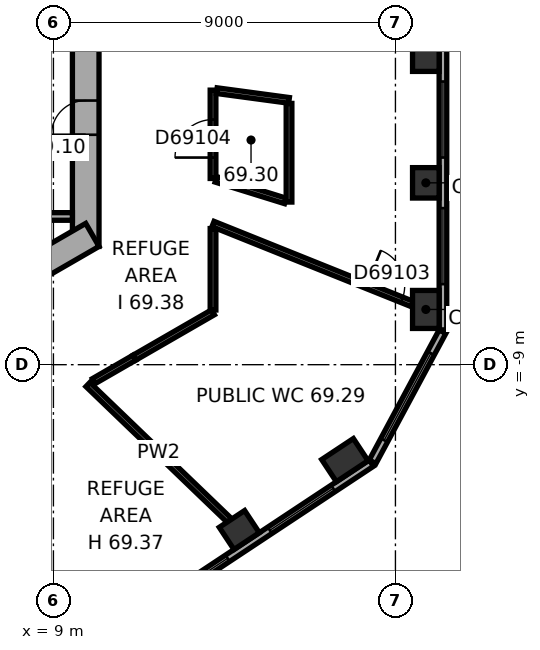
"""IFC4 building model, lengths in metres.
Left out: names, types, materials, properties, quantities, classifications, styles, units other than length and angle.
Written with IfcOpenShell. Run it as: python <this file> out.ifc"""

import sys

from ifc_helpers import new_model, si_unit, direction, frame, frame_2d, origin, origin_2d, place, context, subcontext, project, spatial, rectangle, extrude, element, fill, save


model = new_model("IFC4")
c1 = context("Model", 3, precision=1e-05, world=origin(), true_north=direction((0.0, 1.0)))
c2 = subcontext(c1, "Body", "Model", "MODEL_VIEW")
j1 = project(units=[si_unit("LENGTHUNIT", "METRE"), si_unit("PLANEANGLEUNIT", "RADIAN")], contexts=[c1])
p1 = place(None, origin())
s1 = spatial("IfcSite", under=j1, at=p1, CompositionType="ELEMENT")
p2 = place(p1, origin())
s2 = spatial("IfcBuilding", under=s1, at=p2, CompositionType="ELEMENT")
p3 = place(p2, frame((0.0, 0.0, 278.3)))
s3 = spatial("IfcBuildingStorey", under=s2, at=p3, CompositionType="ELEMENT", Elevation=278.3)
p4 = place(p3, frame((18.8, -7.547, 0.0), z_axis=(0.0, 0.0, 1.0), x_axis=(0.0, 1.0, 0.0)))
e1 = element("IfcColumn", 1, at=p4, inside=s3, PredefinedType="COLUMN", context=c2, shape_type="SweptSolid", body=[
    extrude(rectangle(XDim=1.0, YDim=0.7, at=origin_2d()), origin(), (0.0, 0.0, 1.0), 7.4),
])
for number, where, z_axis, x_axis in (
    (2, (18.8, -4.215, 0.0), (0.0, 0.0, 1.0), (0.0, 1.0, 0.0)),
    (3, (18.8, -0.883, 0.0), (0.0, 0.0, 1.0), (0.0, 1.0, 0.0)),
    (4, (13.891, -13.351, 0.0), (0.0, 0.0, 1.0), (0.834, 0.552, 0.0)),
):
    element("IfcColumn", number, at=place(p3, frame(where, z_axis=z_axis, x_axis=x_axis)), inside=s3, PredefinedType="COLUMN", context=c2, shape_type="SweptSolid", body=[
        extrude(rectangle(XDim=0.8, YDim=0.7, at=origin_2d()), origin(), (0.0, 0.0, 1.0), 7.4),
    ])
p5 = place(p3, frame((16.669, -11.512, 0.0), z_axis=(0.0, 0.0, 1.0), x_axis=(0.833885822067, 0.551936985312, 0.0)))
e5 = element("IfcColumn", 5, at=p5, inside=s3, PredefinedType="COLUMN", context=c2, shape_type="SweptSolid", body=[
    extrude(rectangle(XDim=1.0, YDim=0.7, at=origin_2d()), origin(), (0.0, 0.0, 1.0), 7.4),
])
p6 = place(p3, frame((9.85, -5.889, 0.0), z_axis=(0.0, 0.0, 1.0), x_axis=(0.0, 1.0, 0.0)))
e6 = element("IfcWall", 6, at=p6, inside=s3, PredefinedType="SHEAR", context=c2, shape_type="SweptSolid", body=[
    extrude(rectangle(XDim=11.778, YDim=0.7, at=frame_2d((5.889, 0.0))), origin(), (0.0, 0.0, 1.0), 7.4),
])
p7 = place(p6, frame((6.089, 0.0, 0.0)))
e7 = element("IfcOpeningElement", 7, at=p7, cuts=e6, PredefinedType="OPENING", context=c2, shape_type="SweptSolid", body=[
    extrude(rectangle(XDim=1.5, YDim=2.1, at=frame_2d((0.75, 1.05))), frame((0.0, 0.36, 0.0), z_axis=(0.0, -1.0, 0.0), x_axis=(1.0, 0.0, 0.0)), (0.0, 0.0, 1.0), 0.72),
])
p8 = place(p6, frame((2.939, 0.0, 0.0)))
e8 = element("IfcOpeningElement", 8, at=p8, cuts=e6, PredefinedType="OPENING", context=c2, shape_type="SweptSolid", body=[
    extrude(rectangle(XDim=0.9, YDim=2.1, at=frame_2d((0.45, 1.05))), frame((0.0, 0.36, 0.0), z_axis=(0.0, -1.0, 0.0), x_axis=(1.0, 0.0, 0.0)), (0.0, 0.0, 1.0), 0.72),
])
p9 = place(p3, frame((-0.175, -11.475, 0.0), z_axis=(0.0, 0.0, 1.0), x_axis=(0.866026453023, 0.499998182661, 0.0)))
e9 = element("IfcWall", 9, at=p9, inside=s3, PredefinedType="SHEAR", context=c2, shape_type="SweptSolid", body=[
    extrude(rectangle(XDim=11.778, YDim=0.7, at=frame_2d((5.889, 0.0))), origin(), (0.0, 0.0, 1.0), 7.4),
])
p10 = place(p9, frame((2.439, 0.0, 0.0)))
e10 = element("IfcOpeningElement", 10, at=p10, cuts=e9, PredefinedType="OPENING", context=c2, shape_type="SweptSolid", body=[
    extrude(rectangle(XDim=1.1, YDim=2.1, at=frame_2d((0.55, 1.05))), frame((0.0, 0.36, 0.0), z_axis=(0.0, -1.0, 0.0), x_axis=(1.0, 0.0, 0.0)), (0.0, 0.0, 1.0), 0.72),
])
p11 = place(p9, frame((5.039, 0.0, 0.0)))
e11 = element("IfcOpeningElement", 11, at=p11, cuts=e9, PredefinedType="OPENING", context=c2, shape_type="SweptSolid", body=[
    extrude(rectangle(XDim=1.1, YDim=2.1, at=frame_2d((0.55, 1.05))), frame((0.0, 0.36, 0.0), z_axis=(0.0, -1.0, 0.0), x_axis=(1.0, 0.0, 0.0)), (0.0, 0.0, 1.0), 0.72),
])
p12 = place(p9, frame((7.639, 0.0, 0.0)))
e12 = element("IfcOpeningElement", 12, at=p12, cuts=e9, PredefinedType="OPENING", context=c2, shape_type="SweptSolid", body=[
    extrude(rectangle(XDim=1.1, YDim=2.1, at=frame_2d((0.55, 1.05))), frame((0.0, 0.36, 0.0), z_axis=(0.0, -1.0, 0.0), x_axis=(1.0, 0.0, 0.0)), (0.0, 0.0, 1.0), 0.72),
])
p13 = place(p3, frame((19.25, -8.084, 0.0), z_axis=(0.0, 0.0, 1.0), x_axis=(0.0, 1.0, 0.0)))
e13 = element("IfcWall", 13, at=p13, inside=s3, PredefinedType="STANDARD", context=c2, shape_type="SweptSolid", body=[
    extrude(rectangle(XDim=17.731, YDim=0.2, at=frame_2d((8.866, 0.0))), origin(), (0.0, 0.0, 1.0), 7.4),
])
p14 = place(p13, frame((1.203, 0.0, 0.8)))
e14 = element("IfcOpeningElement", 14, at=p14, cuts=e13, PredefinedType="OPENING", context=c2, shape_type="SweptSolid", body=[
    extrude(rectangle(XDim=2.0, YDim=4.2, at=frame_2d((1.0, 2.1))), frame((0.0, 0.11, 0.0), z_axis=(0.0, -1.0, 0.0), x_axis=(1.0, 0.0, 0.0)), (0.0, 0.0, 1.0), 0.22),
])
p15 = place(p13, frame((4.535, 0.0, 0.8)))
e15 = element("IfcOpeningElement", 15, at=p15, cuts=e13, PredefinedType="OPENING", context=c2, shape_type="SweptSolid", body=[
    extrude(rectangle(XDim=2.0, YDim=4.2, at=frame_2d((1.0, 2.1))), frame((0.0, 0.11, 0.0), z_axis=(0.0, -1.0, 0.0), x_axis=(1.0, 0.0, 0.0)), (0.0, 0.0, 1.0), 0.22),
])
p16 = place(p13, frame((7.866, 0.0, 0.8)))
e16 = element("IfcOpeningElement", 16, at=p16, cuts=e13, PredefinedType="OPENING", context=c2, shape_type="SweptSolid", body=[
    extrude(rectangle(XDim=2.0, YDim=4.2, at=frame_2d((1.0, 2.1))), frame((0.0, 0.11, 0.0), z_axis=(0.0, -1.0, 0.0), x_axis=(1.0, 0.0, 0.0)), (0.0, 0.0, 1.0), 0.22),
])
p17 = place(p13, frame((11.198, 0.0, 0.8)))
e17 = element("IfcOpeningElement", 17, at=p17, cuts=e13, PredefinedType="OPENING", context=c2, shape_type="SweptSolid", body=[
    extrude(rectangle(XDim=2.0, YDim=4.2, at=frame_2d((1.0, 2.1))), frame((0.0, 0.11, 0.0), z_axis=(0.0, -1.0, 0.0), x_axis=(1.0, 0.0, 0.0)), (0.0, 0.0, 1.0), 0.22),
])
p18 = place(p13, frame((14.53, 0.0, 0.8)))
e18 = element("IfcOpeningElement", 18, at=p18, cuts=e13, PredefinedType="OPENING", context=c2, shape_type="SweptSolid", body=[
    extrude(rectangle(XDim=2.0, YDim=4.2, at=frame_2d((1.0, 2.1))), frame((0.0, 0.11, 0.0), z_axis=(0.0, -1.0, 0.0), x_axis=(1.0, 0.0, 0.0)), (0.0, 0.0, 1.0), 0.22),
])
p19 = place(p3, frame((2.58, -21.377, 0.0), z_axis=(0.0, 0.0, 1.0), x_axis=(0.833888592176, 0.551932800112, 0.0)))
e19 = element("IfcWall", 19, at=p19, inside=s3, PredefinedType="STANDARD", context=c2, shape_type="SweptSolid", body=[
    extrude(rectangle(XDim=17.731, YDim=0.2, at=frame_2d((8.866, 0.0))), origin(), (0.0, 0.0, 1.0), 7.4),
])
p20 = place(p19, frame((1.202, 0.0, 0.8)))
e20 = element("IfcOpeningElement", 20, at=p20, cuts=e19, PredefinedType="OPENING", context=c2, shape_type="SweptSolid", body=[
    extrude(rectangle(XDim=2.0, YDim=4.2, at=frame_2d((1.0, 2.1))), frame((0.0, 0.11, 0.0), z_axis=(0.0, -1.0, 0.0), x_axis=(1.0, 0.0, 0.0)), (0.0, 0.0, 1.0), 0.22),
])
p21 = place(p19, frame((4.533, 0.0, 0.8)))
e21 = element("IfcOpeningElement", 21, at=p21, cuts=e19, PredefinedType="OPENING", context=c2, shape_type="SweptSolid", body=[
    extrude(rectangle(XDim=2.0, YDim=4.2, at=frame_2d((1.0, 2.1))), frame((0.0, 0.11, 0.0), z_axis=(0.0, -1.0, 0.0), x_axis=(1.0, 0.0, 0.0)), (0.0, 0.0, 1.0), 0.22),
])
p22 = place(p19, frame((7.865, 0.0, 0.8)))
e22 = element("IfcOpeningElement", 22, at=p22, cuts=e19, PredefinedType="OPENING", context=c2, shape_type="SweptSolid", body=[
    extrude(rectangle(XDim=2.0, YDim=4.2, at=frame_2d((1.0, 2.1))), frame((0.0, 0.11, 0.0), z_axis=(0.0, -1.0, 0.0), x_axis=(1.0, 0.0, 0.0)), (0.0, 0.0, 1.0), 0.22),
])
p23 = place(p19, frame((11.197, 0.0, 0.8)))
e23 = element("IfcOpeningElement", 23, at=p23, cuts=e19, PredefinedType="OPENING", context=c2, shape_type="SweptSolid", body=[
    extrude(rectangle(XDim=2.0, YDim=4.2, at=frame_2d((1.0, 2.1))), frame((0.0, 0.11, 0.0), z_axis=(0.0, -1.0, 0.0), x_axis=(1.0, 0.0, 0.0)), (0.0, 0.0, 1.0), 0.22),
])
p24 = place(p19, frame((14.528, 0.0, 0.8)))
e24 = element("IfcOpeningElement", 24, at=p24, cuts=e19, PredefinedType="OPENING", context=c2, shape_type="SweptSolid", body=[
    extrude(rectangle(XDim=2.0, YDim=4.2, at=frame_2d((1.0, 2.1))), frame((0.0, 0.11, 0.0), z_axis=(0.0, -1.0, 0.0), x_axis=(1.0, 0.0, 0.0)), (0.0, 0.0, 1.0), 0.22),
])
p25 = place(p3, frame((17.399, -11.554, 0.0), z_axis=(0.0, 0.0, 1.0), x_axis=(0.473309051311, 0.880896442238, 0.0)))
e25 = element("IfcWall", 25, at=p25, inside=s3, PredefinedType="STANDARD", context=c2, shape_type="SweptSolid", body=[
    extrude(rectangle(XDim=3.886, YDim=0.2, at=frame_2d((1.943, 0.0))), origin(), (0.0, 0.0, 1.0), 7.4),
])
p26 = place(p25, frame((0.643, 0.0, 0.8)))
e26 = element("IfcOpeningElement", 26, at=p26, cuts=e25, PredefinedType="OPENING", context=c2, shape_type="SweptSolid", body=[
    extrude(rectangle(XDim=2.6, YDim=4.2, at=frame_2d((1.3, 2.1))), frame((0.0, 0.11, 0.0), z_axis=(0.0, -1.0, 0.0), x_axis=(1.0, 0.0, 0.0)), (0.0, 0.0, 1.0), 0.22),
])
p27 = place(p3, frame((7.3, -5.1, 0.0), z_axis=(0.0, 0.0, 1.0), x_axis=(1.0, 0.0, 0.0)))
e27 = element("IfcWall", 27, at=p27, inside=s3, PredefinedType="PARTITIONING", context=c2, shape_type="SweptSolid", body=[
    extrude(rectangle(XDim=2.2, YDim=0.2, at=frame_2d((1.1, 0.0))), origin(), (0.0, 0.0, 1.0), 7.12),
])
p28 = place(p3, frame((13.633, -13.102, 0.0), z_axis=(0.0, 0.0, 1.0), x_axis=(-0.721024625755, 0.692909437845, 0.0)))
e28 = element("IfcWall", 28, at=p28, inside=s3, PredefinedType="PARTITIONING", context=c2, shape_type="SweptSolid", body=[
    extrude(rectangle(XDim=5.167, YDim=0.15, at=frame_2d((2.583, 0.0))), origin(), (0.0, 0.0, 1.0), 6.57),
])
p29 = place(p3, frame((11.127, -8.817, 0.0), z_axis=(0.0, 0.0, 1.0), x_axis=(-0.866020046725, -0.500009278584, 0.0)))
e29 = element("IfcWall", 29, at=p29, inside=s3, PredefinedType="PARTITIONING", context=c2, shape_type="SweptSolid", body=[
    extrude(rectangle(XDim=1.228, YDim=0.15, at=frame_2d((0.614, 0.0))), origin(), (0.0, 0.0, 1.0), 7.12),
])
p30 = place(p3, frame((11.127, -8.817, 0.0), z_axis=(0.0, 0.0, 1.0), x_axis=(0.866075162418, 0.499913805613, 0.0)))
e30 = element("IfcWall", 30, at=p30, inside=s3, PredefinedType="PARTITIONING", context=c2, shape_type="SweptSolid", body=[
    extrude(rectangle(XDim=2.393, YDim=0.15, at=frame_2d((1.197, 0.0))), origin(), (0.0, 0.0, 1.0), 7.12),
])
p31 = place(p3, frame((13.2, -7.561, 0.0), z_axis=(0.0, 0.0, 1.0), x_axis=(0.0, 1.0, 0.0)))
e31 = element("IfcWall", 31, at=p31, inside=s3, PredefinedType="PARTITIONING", context=c2, shape_type="SweptSolid", body=[
    extrude(rectangle(XDim=2.143, YDim=0.15, at=frame_2d((1.071, 0.0))), origin(), (0.0, 0.0, 1.0), 7.12),
])
p32 = place(p3, frame((13.2, -5.299, 0.0), z_axis=(0.0, 0.0, 1.0), x_axis=(0.928023609597, -0.372521381977, 0.0)))
e32 = element("IfcWall", 32, at=p32, inside=s3, PredefinedType="PARTITIONING", context=c2, shape_type="SweptSolid", body=[
    extrude(rectangle(XDim=5.657, YDim=0.15, at=frame_2d((2.829, 0.0))), origin(), (0.0, 0.0, 1.0), 6.57),
])
p33 = place(p32, frame((4.357, 0.0, 0.0)))
e33 = element("IfcOpeningElement", 33, at=p33, cuts=e32, PredefinedType="OPENING", context=c2, shape_type="SweptSolid", body=[
    extrude(rectangle(XDim=1.0, YDim=2.1, at=frame_2d((0.5, 1.05))), frame((0.0, 0.085, 0.0), z_axis=(0.0, -1.0, 0.0), x_axis=(1.0, 0.0, 0.0)), (0.0, 0.0, 1.0), 0.17),
])
p34 = place(p3, frame((15.104, -4.691, 0.0), z_axis=(0.0, 0.0, 1.0), x_axis=(-0.955023043559, 0.296531594054, 0.0)))
e34 = element("IfcWall", 34, at=p34, inside=s3, PredefinedType="PARTITIONING", context=c2, shape_type="SweptSolid", body=[
    extrude(rectangle(XDim=1.914, YDim=0.15, at=frame_2d((0.957, 0.0))), origin(), (0.0, 0.0, 1.0), 7.12),
])
p35 = place(p3, frame((13.2, -4.1, 0.0), z_axis=(0.0, 0.0, 1.0), x_axis=(0.0, 1.0, 0.0)))
e35 = element("IfcWall", 35, at=p35, inside=s3, PredefinedType="PARTITIONING", context=c2, shape_type="SweptSolid", body=[
    extrude(rectangle(XDim=2.324, YDim=0.15, at=frame_2d((1.162, 0.0))), origin(), (0.0, 0.0, 1.0), 7.12),
])
p36 = place(p35, frame((0.55, 0.0, 0.0)))
e36 = element("IfcOpeningElement", 36, at=p36, cuts=e35, PredefinedType="OPENING", context=c2, shape_type="SweptSolid", body=[
    extrude(rectangle(XDim=1.0, YDim=2.1, at=frame_2d((0.5, 1.05))), frame((0.0, 0.085, 0.0), z_axis=(0.0, -1.0, 0.0), x_axis=(1.0, 0.0, 0.0)), (0.0, 0.0, 1.0), 0.17),
])
p37 = place(p3, frame((15.2, -2.125, 0.0), z_axis=(0.0, 0.0, 1.0), x_axis=(0.0, -1.0, 0.0)))
e37 = element("IfcWall", 37, at=p37, inside=s3, PredefinedType="PARTITIONING", context=c2, shape_type="SweptSolid", body=[
    extrude(rectangle(XDim=2.595, YDim=0.15, at=frame_2d((1.298, 0.0))), origin(), (0.0, 0.0, 1.0), 7.12),
])
p38 = place(p3, frame((13.299, -1.789, 0.0), z_axis=(0.0, 0.0, 1.0), x_axis=(0.991045767705, -0.133522606001, 0.0)))
e38 = element("IfcWall", 38, at=p38, inside=s3, PredefinedType="PARTITIONING", context=c2, shape_type="SweptSolid", body=[
    extrude(rectangle(XDim=1.918, YDim=0.15, at=frame_2d((0.959, 0.0))), origin(), (0.0, 0.0, 1.0), 7.12),
])
p39 = place(p14, origin())
e39 = element("IfcWindow", 39, at=p39, inside=s3, PartitioningType="SINGLE_PANEL", PredefinedType="WINDOW", context=c2, shape_type="SweptSolid", body=[
    extrude(rectangle(XDim=2.0, YDim=4.2, at=frame_2d((1.0, 2.1))), frame((0.0, 0.03, 0.0), z_axis=(0.0, -1.0, 0.0), x_axis=(1.0, 0.0, 0.0)), (0.0, 0.0, 1.0), 0.06),
])
fill(e14, e39)
p40 = place(p15, origin())
e40 = element("IfcWindow", 40, at=p40, inside=s3, PartitioningType="SINGLE_PANEL", PredefinedType="WINDOW", context=c2, shape_type="SweptSolid", body=[
    extrude(rectangle(XDim=2.0, YDim=4.2, at=frame_2d((1.0, 2.1))), frame((0.0, 0.03, 0.0), z_axis=(0.0, -1.0, 0.0), x_axis=(1.0, 0.0, 0.0)), (0.0, 0.0, 1.0), 0.06),
])
fill(e15, e40)
p41 = place(p23, origin())
e41 = element("IfcWindow", 41, at=p41, inside=s3, PartitioningType="SINGLE_PANEL", PredefinedType="WINDOW", context=c2, shape_type="SweptSolid", body=[
    extrude(rectangle(XDim=2.0, YDim=4.2, at=frame_2d((1.0, 2.1))), frame((0.0, 0.03, 0.0), z_axis=(0.0, -1.0, 0.0), x_axis=(1.0, 0.0, 0.0)), (0.0, 0.0, 1.0), 0.06),
])
fill(e23, e41)
p42 = place(p24, origin())
e42 = element("IfcWindow", 42, at=p42, inside=s3, PartitioningType="SINGLE_PANEL", PredefinedType="WINDOW", context=c2, shape_type="SweptSolid", body=[
    extrude(rectangle(XDim=2.0, YDim=4.2, at=frame_2d((1.0, 2.1))), frame((0.0, 0.03, 0.0), z_axis=(0.0, -1.0, 0.0), x_axis=(1.0, 0.0, 0.0)), (0.0, 0.0, 1.0), 0.06),
])
fill(e24, e42)
p43 = place(p26, origin())
e43 = element("IfcWindow", 43, at=p43, inside=s3, PartitioningType="SINGLE_PANEL", PredefinedType="WINDOW", context=c2, shape_type="SweptSolid", body=[
    extrude(rectangle(XDim=2.6, YDim=4.2, at=frame_2d((1.3, 2.1))), frame((0.0, 0.03, 0.0), z_axis=(0.0, -1.0, 0.0), x_axis=(1.0, 0.0, 0.0)), (0.0, 0.0, 1.0), 0.06),
])
fill(e26, e43)
p44 = place(p8, origin())
e44 = element("IfcDoor", 44, at=p44, inside=s3, OperationType="SINGLE_SWING_LEFT", PredefinedType="DOOR", context=c2, shape_type="SweptSolid", body=[
    extrude(rectangle(XDim=0.9, YDim=2.1, at=frame_2d((0.45, 1.05))), frame((0.0, 0.025, 0.0), z_axis=(0.0, -1.0, 0.0), x_axis=(1.0, 0.0, 0.0)), (0.0, 0.0, 1.0), 0.05),
])
fill(e8, e44)
p45 = place(p33, origin())
e45 = element("IfcDoor", 45, at=p45, inside=s3, OperationType="SINGLE_SWING_LEFT", PredefinedType="DOOR", context=c2, shape_type="SweptSolid", body=[
    extrude(rectangle(XDim=1.0, YDim=2.1, at=frame_2d((0.5, 1.05))), frame((0.0, 0.025, 0.0), z_axis=(0.0, -1.0, 0.0), x_axis=(1.0, 0.0, 0.0)), (0.0, 0.0, 1.0), 0.05),
])
fill(e33, e45)
p46 = place(p36, origin())
e46 = element("IfcDoor", 46, at=p46, inside=s3, OperationType="SINGLE_SWING_LEFT", PredefinedType="DOOR", context=c2, shape_type="SweptSolid", body=[
    extrude(rectangle(XDim=1.0, YDim=2.1, at=frame_2d((0.5, 1.05))), frame((0.0, 0.025, 0.0), z_axis=(0.0, -1.0, 0.0), x_axis=(1.0, 0.0, 0.0)), (0.0, 0.0, 1.0), 0.05),
])
fill(e36, e46)
save(model, sys.argv[1])
